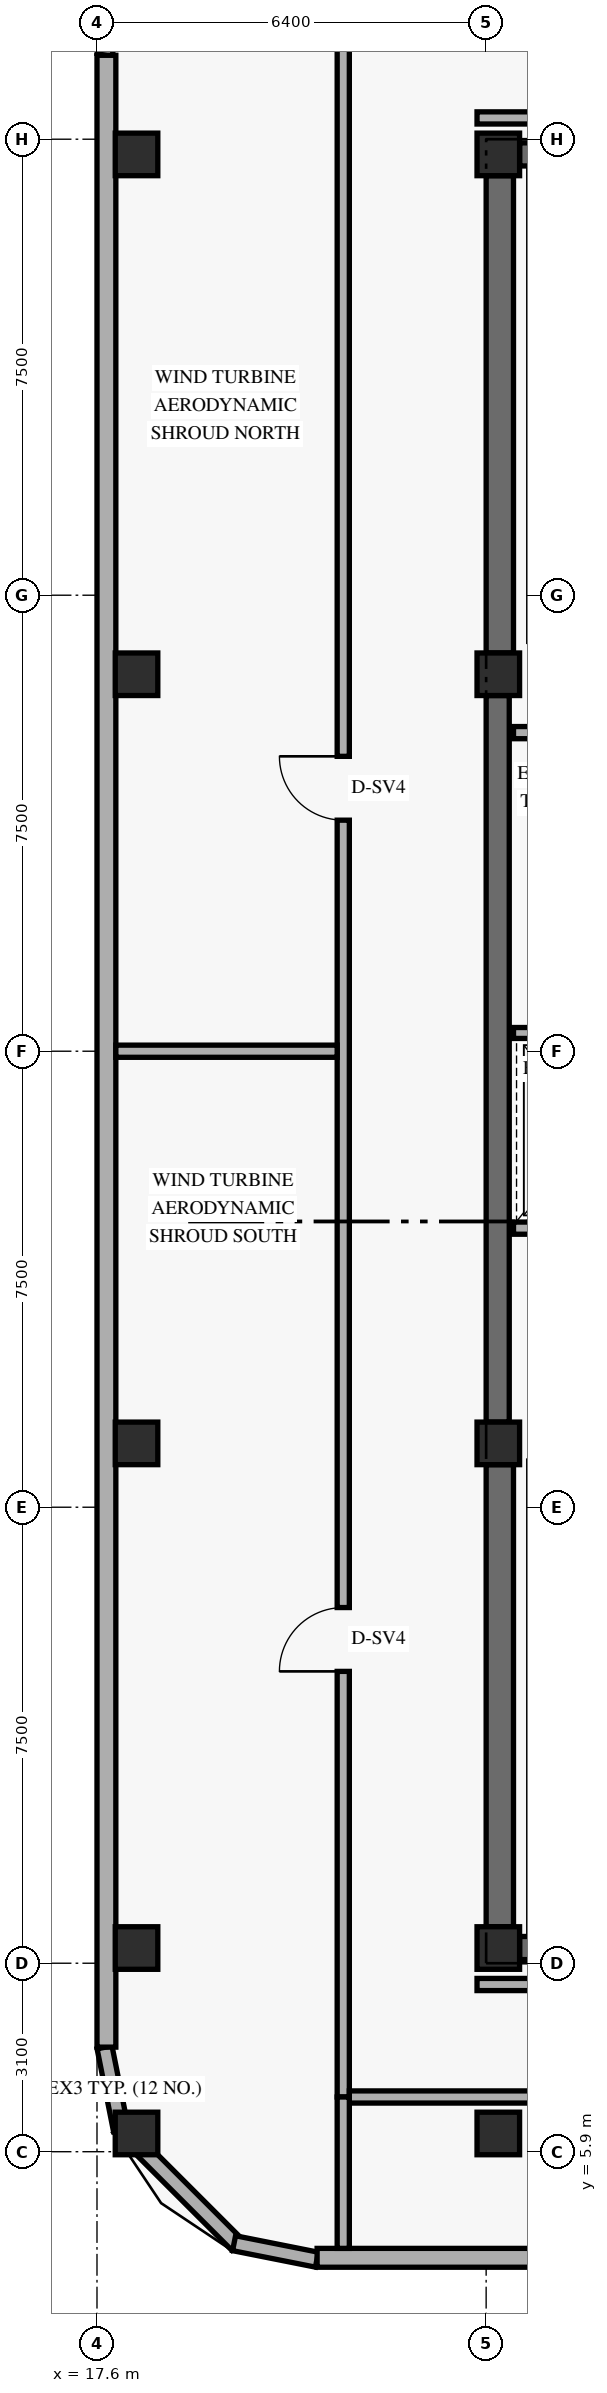
"""IFC4 building model, lengths in metres.
Left out: names, types, materials, properties, quantities, classifications, styles, units other than length and angle.
Written with IfcOpenShell. Run it as: python <this file> out.ifc"""

import sys

from ifc_helpers import new_model, si_unit, direction, frame, frame_2d, origin, origin_2d, place, context, subcontext, project, spatial, rectangle, extrude, element, fill, save


model = new_model("IFC4")
c1 = context("Model", 3, precision=1e-05, world=origin(), true_north=direction((0.0, 1.0)))
c2 = subcontext(c1, "Body", "Model", "MODEL_VIEW")
j1 = project(units=[si_unit("LENGTHUNIT", "METRE"), si_unit("PLANEANGLEUNIT", "RADIAN")], contexts=[c1])
p1 = place(None, origin())
s1 = spatial("IfcSite", under=j1, at=p1, CompositionType="ELEMENT")
p2 = place(p1, origin())
s2 = spatial("IfcBuilding", under=s1, at=p2, CompositionType="ELEMENT")
p3 = place(p2, frame((0.0, 0.0, 199.8)))
s3 = spatial("IfcBuildingStorey", under=s2, at=p3, CompositionType="ELEMENT", Elevation=199.8)
p4 = place(p3, frame((24.225, 9.6, 0.0), z_axis=(0.0, 0.0, 1.0), x_axis=(0.0, 1.0, 0.0)))
e1 = element("IfcWall", 1, at=p4, inside=s3, PredefinedType="SHEAR", context=c2, shape_type="SweptSolid", body=[
    extrude(rectangle(XDim=7.6, YDim=0.45, at=frame_2d((3.8, 0.0))), origin(), (0.0, 0.0, 1.0), 5.148),
])
p5 = place(p3, frame((24.19, 17.9, 0.0), z_axis=(0.0, 0.0, 1.0), x_axis=(0.0, 1.0, 0.0)))
e2 = element("IfcWall", 2, at=p5, inside=s3, PredefinedType="SHEAR", context=c2, shape_type="SweptSolid", body=[
    extrude(rectangle(XDim=11.95, YDim=0.38, at=frame_2d((5.975, 0.0))), origin(), (0.0, 0.0, 1.0), 5.148),
])
p6 = place(p3, frame((24.225, 30.55, 0.0), z_axis=(0.0, 0.0, 1.0), x_axis=(0.0, 1.0, 0.0)))
e3 = element("IfcWall", 3, at=p6, inside=s3, PredefinedType="SHEAR", context=c2, shape_type="SweptSolid", body=[
    extrude(rectangle(XDim=7.85, YDim=0.45, at=frame_2d((3.925, 0.0))), origin(), (0.0, 0.0, 1.0), 5.148),
])
for number, where, z_axis, x_axis in (
    (4, (24.55, 9.25, 0.0), (0.0, 0.0, 1.0), (1.0, 0.0, 0.0)),
    (5, (24.55, 38.75, 0.0), (0.0, 0.0, 1.0), (1.0, 0.0, 0.0)),
):
    element("IfcWall", number, at=place(p3, frame(where, z_axis=z_axis, x_axis=x_axis)), inside=s3, PredefinedType="SHEAR", context=c2, shape_type="SweptSolid", body=[
        extrude(rectangle(XDim=10.3, YDim=0.38, at=frame_2d((5.15, 0.0))), origin(), (0.0, 0.0, 1.0), 5.76),
    ])
for number, where, z_axis, x_axis in (
    (6, (18.25, 6.2, 0.0), (0.0, 0.0, 1.0), (1.0, 0.0, 0.0)),
    (7, (18.25, 9.25, 0.0), (0.0, 0.0, 1.0), (1.0, 0.0, 0.0)),
    (8, (18.25, 17.55, 0.0), (0.0, 0.0, 1.0), (1.0, 0.0, 0.0)),
    (9, (18.25, 30.2, 0.0), (0.0, 0.0, 1.0), (1.0, 0.0, 0.0)),
    (10, (18.25, 38.75, 0.0), (0.0, 0.0, 1.0), (1.0, 0.0, 0.0)),
    (11, (24.2, 6.2, 0.0), (0.0, 0.0, 1.0), (1.0, 0.0, 0.0)),
    (12, (24.2, 9.25, 0.0), (0.0, 0.0, 1.0), (1.0, 0.0, 0.0)),
    (13, (24.2, 17.55, 0.0), (0.0, 0.0, 1.0), (1.0, 0.0, 0.0)),
    (14, (24.2, 30.2, 0.0), (0.0, 0.0, 1.0), (1.0, 0.0, 0.0)),
    (15, (24.2, 38.75, 0.0), (0.0, 0.0, 1.0), (1.0, 0.0, 0.0)),
):
    element("IfcColumn", number, at=place(p3, frame(where, z_axis=z_axis, x_axis=x_axis)), inside=s3, PredefinedType="COLUMN", context=c2, shape_type="SweptSolid", body=[
        extrude(rectangle(XDim=0.7, YDim=0.7, at=origin_2d()), origin(), (0.0, 0.0, 1.0), 6.0),
    ])
p7 = place(p3, frame((17.724, 7.616, 0.0), z_axis=(0.0, 0.0, 1.0), x_axis=(0.195135625965, -0.9807762678, 0.0)))
e16 = element("IfcWall", 16, at=p7, inside=s3, PredefinedType="SOLIDWALL", context=c2, shape_type="SweptSolid", body=[
    extrude(rectangle(XDim=1.389, YDim=0.25, at=frame_2d((0.694, 0.0))), origin(), (0.0, 0.0, 1.0), 5.76),
])
p8 = place(p3, frame((17.968, 6.305, 0.0), z_axis=(0.0, 0.0, 1.0), x_axis=(0.707106781187, -0.707106781187, 0.0)))
e17 = element("IfcWall", 17, at=p8, inside=s3, PredefinedType="SOLIDWALL", context=c2, shape_type="SweptSolid", body=[
    extrude(rectangle(XDim=2.739, YDim=0.25, at=frame_2d((1.37, 0.0))), origin(), (0.0, 0.0, 1.0), 5.76),
])
for number, where, z_axis, x_axis in (
    (18, (19.854, 4.395, 0.0), (0.0, 0.0, 1.0), (0.981, -0.195, 0.0)),
    (19, (17.995, 41.746, 0.0), (0.0, 0.0, 1.0), (-0.195, -0.981, 0.0)),
):
    element("IfcWall", number, at=place(p3, frame(where, z_axis=z_axis, x_axis=x_axis)), inside=s3, PredefinedType="SOLIDWALL", context=c2, shape_type="SweptSolid", body=[
        extrude(rectangle(XDim=1.389, YDim=0.25, at=frame_2d((0.694, 0.0))), origin(), (0.0, 0.0, 1.0), 5.76),
    ])
p9 = place(p3, frame((21.22, 4.155, 0.0), z_axis=(0.0, 0.0, 1.0), x_axis=(1.0, 0.0, 0.0)))
e20 = element("IfcWall", 20, at=p9, inside=s3, PredefinedType="SOLIDWALL", context=c2, shape_type="SweptSolid", body=[
    extrude(rectangle(XDim=33.76, YDim=0.31, at=frame_2d((16.88, 0.0))), origin(), (0.0, 0.0, 1.0), 5.76),
])
p10 = place(p3, frame((17.755, 40.38, 0.0), z_axis=(0.0, 0.0, 1.0), x_axis=(0.0, -1.0, 0.0)))
e21 = element("IfcWall", 21, at=p10, inside=s3, PredefinedType="SOLIDWALL", context=c2, shape_type="SweptSolid", body=[
    extrude(rectangle(XDim=32.76, YDim=0.31, at=frame_2d((16.38, 0.0))), origin(), (0.0, 0.0, 1.0), 5.76),
])
p11 = place(p3, frame((24.45, 21.09, 0.0), z_axis=(0.0, 0.0, 1.0), x_axis=(1.0, 0.0, 0.0)))
e22 = element("IfcWall", 22, at=p11, inside=s3, PredefinedType="STANDARD", context=c2, shape_type="SweptSolid", body=[
    extrude(rectangle(XDim=6.83, YDim=0.2, at=frame_2d((3.415, 0.0))), origin(), (0.0, 0.0, 1.0), 5.76),
])
p12 = place(p11, frame((0.72, 0.0, 0.0)))
e23 = element("IfcOpeningElement", 23, at=p12, cuts=e22, PredefinedType="OPENING", context=c2, shape_type="SweptSolid", body=[
    extrude(rectangle(XDim=1.1, YDim=2.2, at=frame_2d((0.55, 1.1))), frame((0.0, 0.11, 0.0), z_axis=(0.0, -1.0, 0.0), x_axis=(1.0, 0.0, 0.0)), (0.0, 0.0, 1.0), 0.22),
])
p13 = place(p11, frame((3.32, 0.0, 0.0)))
e24 = element("IfcOpeningElement", 24, at=p13, cuts=e22, PredefinedType="OPENING", context=c2, shape_type="SweptSolid", body=[
    extrude(rectangle(XDim=1.1, YDim=2.2, at=frame_2d((0.55, 1.1))), frame((0.0, 0.11, 0.0), z_axis=(0.0, -1.0, 0.0), x_axis=(1.0, 0.0, 0.0)), (0.0, 0.0, 1.0), 0.22),
])
p14 = place(p3, frame((24.45, 24.3, 0.0), z_axis=(0.0, 0.0, 1.0), x_axis=(1.0, 0.0, 0.0)))
e25 = element("IfcWall", 25, at=p14, inside=s3, PredefinedType="STANDARD", context=c2, shape_type="SweptSolid", body=[
    extrude(rectangle(XDim=6.83, YDim=0.18, at=frame_2d((3.415, 0.0))), origin(), (0.0, 0.0, 1.0), 5.76),
])
p15 = place(p3, frame((24.45, 29.24, 0.0), z_axis=(0.0, 0.0, 1.0), x_axis=(1.0, 0.0, 0.0)))
e26 = element("IfcWall", 26, at=p15, inside=s3, PredefinedType="STANDARD", context=c2, shape_type="SweptSolid", body=[
    extrude(rectangle(XDim=3.65, YDim=0.2, at=frame_2d((1.825, 0.0))), origin(), (0.0, 0.0, 1.0), 5.76),
])
p16 = place(p3, frame((21.65, 6.8, 0.0), z_axis=(0.0, 0.0, 1.0), x_axis=(0.0, 1.0, 0.0)))
e27 = element("IfcWall", 27, at=p16, inside=s3, PredefinedType="STANDARD", context=c2, shape_type="SweptSolid", body=[
    extrude(rectangle(XDim=34.4, YDim=0.2, at=frame_2d((17.2, 0.0))), origin(), (0.0, 0.0, 1.0), 5.13),
])
p17 = place(p16, frame((7.0, 0.0, 0.0)))
e28 = element("IfcOpeningElement", 28, at=p17, cuts=e27, PredefinedType="OPENING", context=c2, shape_type="SweptSolid", body=[
    extrude(rectangle(XDim=1.05, YDim=2.15, at=frame_2d((0.525, 1.075))), frame((0.0, 0.11, 0.0), z_axis=(0.0, -1.0, 0.0), x_axis=(1.0, 0.0, 0.0)), (0.0, 0.0, 1.0), 0.22),
])
p18 = place(p16, frame((21.0, 0.0, 0.0)))
e29 = element("IfcOpeningElement", 29, at=p18, cuts=e27, PredefinedType="OPENING", context=c2, shape_type="SweptSolid", body=[
    extrude(rectangle(XDim=1.05, YDim=2.15, at=frame_2d((0.525, 1.075))), frame((0.0, 0.11, 0.0), z_axis=(0.0, -1.0, 0.0), x_axis=(1.0, 0.0, 0.0)), (0.0, 0.0, 1.0), 0.22),
])
p19 = place(p3, frame((21.75, 6.8, 0.0), z_axis=(0.0, 0.0, 1.0), x_axis=(1.0, 0.0, 0.0)))
e30 = element("IfcWall", 30, at=p19, inside=s3, PredefinedType="STANDARD", context=c2, shape_type="SweptSolid", body=[
    extrude(rectangle(XDim=15.6, YDim=0.2, at=frame_2d((7.8, 0.0))), origin(), (0.0, 0.0, 1.0), 5.13),
])
p20 = place(p19, frame((5.1, 0.0, 0.0)))
e31 = element("IfcOpeningElement", 31, at=p20, cuts=e30, PredefinedType="OPENING", context=c2, shape_type="SweptSolid", body=[
    extrude(rectangle(XDim=0.9, YDim=2.1, at=frame_2d((0.45, 1.05))), frame((0.0, 0.11, 0.0), z_axis=(0.0, -1.0, 0.0), x_axis=(1.0, 0.0, 0.0)), (0.0, 0.0, 1.0), 0.22),
])
for number, where, z_axis, x_axis in (
    (32, (23.85, 39.35, 0.0), (0.0, 0.0, 1.0), (1.0, 0.0, 0.0)),
    (33, (23.85, 8.65, 0.0), (0.0, 0.0, 1.0), (1.0, 0.0, 0.0)),
):
    element("IfcWall", number, at=place(p3, frame(where, z_axis=z_axis, x_axis=x_axis)), inside=s3, PredefinedType="STANDARD", context=c2, shape_type="SweptSolid", body=[
        extrude(rectangle(XDim=11.47, YDim=0.2, at=frame_2d((5.735, 0.0))), origin(), (0.0, 0.0, 1.0), 5.13),
    ])
p21 = place(p3, frame((21.65, 4.31, 0.0), z_axis=(0.0, 0.0, 1.0), x_axis=(0.0, 1.0, 0.0)))
e34 = element("IfcWall", 34, at=p21, inside=s3, PredefinedType="STANDARD", context=c2, shape_type="SweptSolid", body=[
    extrude(rectangle(XDim=2.49, YDim=0.2, at=frame_2d((1.245, 0.0))), origin(), (0.0, 0.0, 1.0), 5.279),
])
p22 = place(p3, frame((17.91, 24.0, 0.0), z_axis=(0.0, 0.0, 1.0), x_axis=(1.0, 0.0, 0.0)))
e35 = element("IfcWall", 35, at=p22, inside=s3, PredefinedType="STANDARD", context=c2, shape_type="SweptSolid", body=[
    extrude(rectangle(XDim=3.64, YDim=0.2, at=frame_2d((1.82, 0.0))), origin(), (0.0, 0.0, 1.0), 5.279),
])
p23 = place(p17, origin())
e36 = element("IfcDoor", 36, at=p23, inside=s3, OperationType="SINGLE_SWING_LEFT", PredefinedType="DOOR", context=c2, shape_type="SweptSolid", body=[
    extrude(rectangle(XDim=1.05, YDim=2.15, at=frame_2d((0.525, 1.075))), frame((0.0, 0.025, 0.0), z_axis=(0.0, -1.0, 0.0), x_axis=(1.0, 0.0, 0.0)), (0.0, 0.0, 1.0), 0.05),
])
fill(e28, e36)
p24 = place(p18, origin())
e37 = element("IfcDoor", 37, at=p24, inside=s3, OperationType="SINGLE_SWING_RIGHT", PredefinedType="DOOR", context=c2, shape_type="SweptSolid", body=[
    extrude(rectangle(XDim=1.05, YDim=2.15, at=frame_2d((0.525, 1.075))), frame((0.0, 0.025, 0.0), z_axis=(0.0, -1.0, 0.0), x_axis=(1.0, 0.0, 0.0)), (0.0, 0.0, 1.0), 0.05),
])
fill(e29, e37)
save(model, sys.argv[1])
